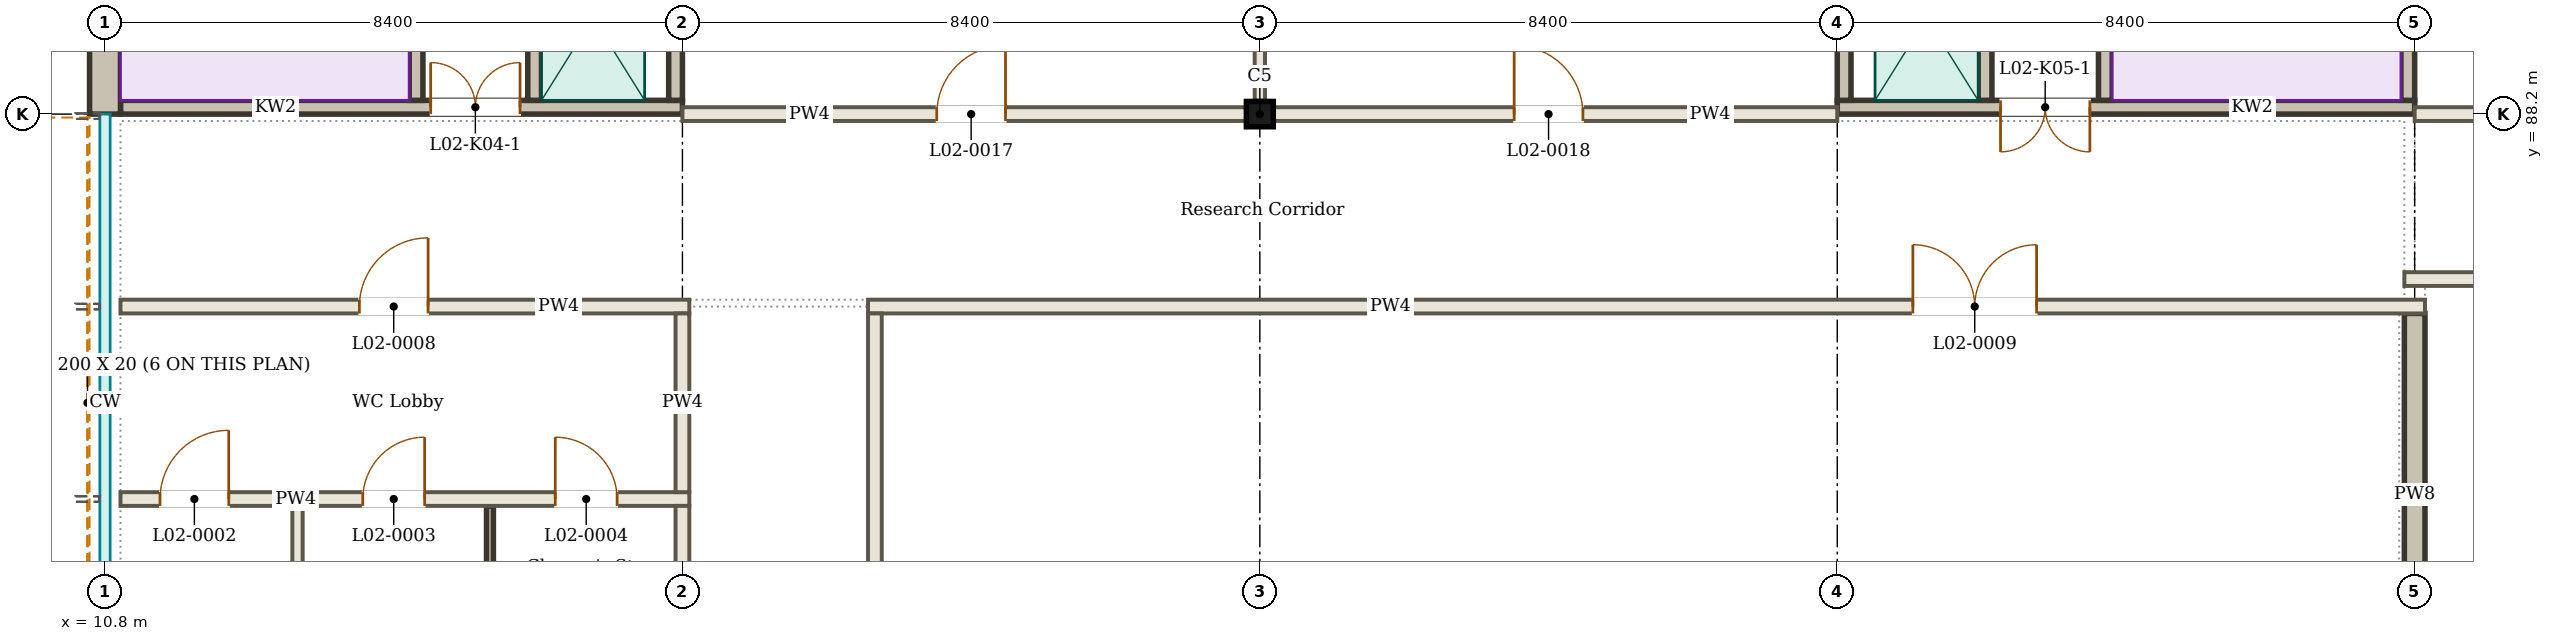
"""IFC4 building model, lengths in metres.
Left out: names, types, materials, properties, quantities, classifications, styles, units other than length and angle.
Written with IfcOpenShell. Run it as: python <this file> out.ifc"""

import sys

from ifc_helpers import new_model, si_unit, direction, frame, frame_2d, origin, origin_2d, place, context, subcontext, project, spatial, rectangle, i_section, extrude, element, fill, save


model = new_model("IFC4")
c1 = context("Model", 3, precision=1e-05, world=origin(), true_north=direction((0.0, 1.0)))
c2 = subcontext(c1, "Body", "Model", "MODEL_VIEW")
j1 = project(units=[si_unit("LENGTHUNIT", "METRE"), si_unit("PLANEANGLEUNIT", "RADIAN")], contexts=[c1])
p1 = place(None, origin())
s1 = spatial("IfcSite", under=j1, at=p1, CompositionType="ELEMENT")
p2 = place(p1, origin())
s2 = spatial("IfcBuilding", under=s1, at=p2, CompositionType="ELEMENT")
p3 = place(p2, frame((0.0, 0.0, 9.0)))
s3 = spatial("IfcBuildingStorey", under=s2, at=p3, CompositionType="ELEMENT", Elevation=9.0)
p4 = place(p3, frame((27.6, 88.2, 0.0), z_axis=(0.0, 0.0, 1.0), x_axis=(1.0, 0.0, 0.0)))
e1 = element("IfcColumn", 1, at=p4, inside=s3, PredefinedType="COLUMN", context=c2, shape_type="SweptSolid", body=[
    extrude(i_section(OverallWidth=0.391, OverallDepth=0.368, WebThickness=0.015, FlangeThickness=0.024, FilletRadius=0.027, at=origin_2d()), origin(), (0.0, 0.0, 1.0), 4.5),
])
p5 = place(p3, frame((10.64, 79.8, 3.87), z_axis=(0.0, 0.0, 1.0), x_axis=(0.0, 1.0, 0.0)))
e2 = element("IfcWall", 2, at=p5, inside=s3, PredefinedType="SOLIDWALL", context=c2, shape_type="SweptSolid", body=[
    extrude(rectangle(XDim=8.4, YDim=0.13, at=frame_2d((4.2, 0.0))), origin(), (0.0, 0.0, 1.0), 0.63),
])
p6 = place(p3, frame((11.025, 82.6, 0.0), z_axis=(0.0, 0.0, 1.0), x_axis=(1.0, 0.0, 0.0)))
e3 = element("IfcWall", 3, at=p6, inside=s3, PredefinedType="PARTITIONING", context=c2, shape_type="SweptSolid", body=[
    extrude(rectangle(XDim=8.275, YDim=0.2, at=frame_2d((4.138, 0.0))), origin(), (0.0, 0.0, 1.0), 3.8),
])
p7 = place(p6, frame((0.575, 0.0, 0.0)))
e4 = element("IfcOpeningElement", 4, at=p7, cuts=e3, PredefinedType="OPENING", context=c2, shape_type="SweptSolid", body=[
    extrude(rectangle(XDim=1.0, YDim=2.1, at=frame_2d((0.5, 1.05))), frame((0.0, 0.11, 0.0), z_axis=(0.0, -1.0, 0.0), x_axis=(1.0, 0.0, 0.0)), (0.0, 0.0, 1.0), 0.22),
])
p8 = place(p6, frame((3.525, 0.0, 0.0)))
e5 = element("IfcOpeningElement", 5, at=p8, cuts=e3, PredefinedType="OPENING", context=c2, shape_type="SweptSolid", body=[
    extrude(rectangle(XDim=0.9, YDim=2.1, at=frame_2d((0.45, 1.05))), frame((0.0, 0.11, 0.0), z_axis=(0.0, -1.0, 0.0), x_axis=(1.0, 0.0, 0.0)), (0.0, 0.0, 1.0), 0.22),
])
p9 = place(p6, frame((6.325, 0.0, 0.0)))
e6 = element("IfcOpeningElement", 6, at=p9, cuts=e3, PredefinedType="OPENING", context=c2, shape_type="SweptSolid", body=[
    extrude(rectangle(XDim=0.9, YDim=2.1, at=frame_2d((0.45, 1.05))), frame((0.0, 0.11, 0.0), z_axis=(0.0, -1.0, 0.0), x_axis=(1.0, 0.0, 0.0)), (0.0, 0.0, 1.0), 0.22),
])
p10 = place(p3, frame((11.025, 85.4, 0.0), z_axis=(0.0, 0.0, 1.0), x_axis=(1.0, 0.0, 0.0)))
e7 = element("IfcWall", 7, at=p10, inside=s3, PredefinedType="PARTITIONING", context=c2, shape_type="SweptSolid", body=[
    extrude(rectangle(XDim=8.275, YDim=0.2, at=frame_2d((4.138, 0.0))), origin(), (0.0, 0.0, 1.0), 3.8),
])
p11 = place(p10, frame((3.475, 0.0, 0.0)))
e8 = element("IfcOpeningElement", 8, at=p11, cuts=e7, PredefinedType="OPENING", context=c2, shape_type="SweptSolid", body=[
    extrude(rectangle(XDim=1.0, YDim=2.1, at=frame_2d((0.5, 1.05))), frame((0.0, 0.11, 0.0), z_axis=(0.0, -1.0, 0.0), x_axis=(1.0, 0.0, 0.0)), (0.0, 0.0, 1.0), 0.22),
])
p12 = place(p3, frame((21.9, 85.4, 0.0), z_axis=(0.0, 0.0, 1.0), x_axis=(1.0, 0.0, 0.0)))
e9 = element("IfcWall", 9, at=p12, inside=s3, PredefinedType="PARTITIONING", context=c2, shape_type="SweptSolid", body=[
    extrude(rectangle(XDim=22.65, YDim=0.2, at=frame_2d((11.325, 0.0))), origin(), (0.0, 0.0, 1.0), 3.8),
])
p13 = place(p12, frame((15.2, 0.0, 0.0)))
e10 = element("IfcOpeningElement", 10, at=p13, cuts=e9, PredefinedType="OPENING", context=c2, shape_type="SweptSolid", body=[
    extrude(rectangle(XDim=1.8, YDim=2.1, at=frame_2d((0.9, 1.05))), frame((0.0, 0.11, 0.0), z_axis=(0.0, -1.0, 0.0), x_axis=(1.0, 0.0, 0.0)), (0.0, 0.0, 1.0), 0.22),
])
p14 = place(p3, frame((44.25, 85.8, 0.0), z_axis=(0.0, 0.0, 1.0), x_axis=(1.0, 0.0, 0.0)))
e11 = element("IfcWall", 11, at=p14, inside=s3, PredefinedType="PARTITIONING", context=c2, shape_type="SweptSolid", body=[
    extrude(rectangle(XDim=67.5, YDim=0.2, at=frame_2d((33.75, 0.0))), origin(), (0.0, 0.0, 1.0), 3.9),
])
p15 = place(p14, frame((7.65, 0.0, 0.0)))
e12 = element("IfcOpeningElement", 12, at=p15, cuts=e11, PredefinedType="OPENING", context=c2, shape_type="SweptSolid", body=[
    extrude(rectangle(XDim=1.8, YDim=2.1, at=frame_2d((0.9, 1.05))), frame((0.0, 0.11, 0.0), z_axis=(0.0, -1.0, 0.0), x_axis=(1.0, 0.0, 0.0)), (0.0, 0.0, 1.0), 0.22),
])
p16 = place(p14, frame((19.25, 0.0, 0.0)))
e13 = element("IfcOpeningElement", 13, at=p16, cuts=e11, PredefinedType="OPENING", context=c2, shape_type="SweptSolid", body=[
    extrude(rectangle(XDim=1.0, YDim=2.1, at=frame_2d((0.5, 1.05))), frame((0.0, 0.11, 0.0), z_axis=(0.0, -1.0, 0.0), x_axis=(1.0, 0.0, 0.0)), (0.0, 0.0, 1.0), 0.22),
])
p17 = place(p14, frame((24.85, 0.0, 0.0)))
e14 = element("IfcOpeningElement", 14, at=p17, cuts=e11, PredefinedType="OPENING", context=c2, shape_type="SweptSolid", body=[
    extrude(rectangle(XDim=1.0, YDim=2.1, at=frame_2d((0.5, 1.05))), frame((0.0, 0.11, 0.0), z_axis=(0.0, -1.0, 0.0), x_axis=(1.0, 0.0, 0.0)), (0.0, 0.0, 1.0), 0.22),
])
p18 = place(p14, frame((31.85, 0.0, 0.0)))
e15 = element("IfcOpeningElement", 15, at=p18, cuts=e11, PredefinedType="OPENING", context=c2, shape_type="SweptSolid", body=[
    extrude(rectangle(XDim=1.0, YDim=2.1, at=frame_2d((0.5, 1.05))), frame((0.0, 0.11, 0.0), z_axis=(0.0, -1.0, 0.0), x_axis=(1.0, 0.0, 0.0)), (0.0, 0.0, 1.0), 0.22),
])
p19 = place(p14, frame((44.05, 0.0, 0.0)))
e16 = element("IfcOpeningElement", 16, at=p19, cuts=e11, PredefinedType="OPENING", context=c2, shape_type="SweptSolid", body=[
    extrude(rectangle(XDim=1.8, YDim=2.1, at=frame_2d((0.9, 1.05))), frame((0.0, 0.11, 0.0), z_axis=(0.0, -1.0, 0.0), x_axis=(1.0, 0.0, 0.0)), (0.0, 0.0, 1.0), 0.22),
])
p20 = place(p14, frame((55.65, 0.0, 0.0)))
e17 = element("IfcOpeningElement", 17, at=p20, cuts=e11, PredefinedType="OPENING", context=c2, shape_type="SweptSolid", body=[
    extrude(rectangle(XDim=1.0, YDim=2.1, at=frame_2d((0.5, 1.05))), frame((0.0, 0.11, 0.0), z_axis=(0.0, -1.0, 0.0), x_axis=(1.0, 0.0, 0.0)), (0.0, 0.0, 1.0), 0.22),
])
p21 = place(p14, frame((62.65, 0.0, 0.0)))
e18 = element("IfcOpeningElement", 18, at=p21, cuts=e11, PredefinedType="OPENING", context=c2, shape_type="SweptSolid", body=[
    extrude(rectangle(XDim=1.0, YDim=2.1, at=frame_2d((0.5, 1.05))), frame((0.0, 0.11, 0.0), z_axis=(0.0, -1.0, 0.0), x_axis=(1.0, 0.0, 0.0)), (0.0, 0.0, 1.0), 0.22),
])
p22 = place(p3, frame((19.2, 88.2, 0.0), z_axis=(0.0, 0.0, 1.0), x_axis=(1.0, 0.0, 0.0)))
e19 = element("IfcWall", 19, at=p22, inside=s3, PredefinedType="PARTITIONING", context=c2, shape_type="SweptSolid", body=[
    extrude(rectangle(XDim=8.205, YDim=0.2, at=frame_2d((4.102, 0.0))), origin(), (0.0, 0.0, 1.0), 3.8),
])
p23 = place(p22, frame((3.7, 0.0, 0.0)))
e20 = element("IfcOpeningElement", 20, at=p23, cuts=e19, PredefinedType="OPENING", context=c2, shape_type="SweptSolid", body=[
    extrude(rectangle(XDim=1.0, YDim=2.1, at=frame_2d((0.5, 1.05))), frame((0.0, 0.11, 0.0), z_axis=(0.0, -1.0, 0.0), x_axis=(1.0, 0.0, 0.0)), (0.0, 0.0, 1.0), 0.22),
])
p24 = place(p3, frame((27.795, 88.2, 0.0), z_axis=(0.0, 0.0, 1.0), x_axis=(1.0, 0.0, 0.0)))
e21 = element("IfcWall", 21, at=p24, inside=s3, PredefinedType="PARTITIONING", context=c2, shape_type="SweptSolid", body=[
    extrude(rectangle(XDim=8.205, YDim=0.2, at=frame_2d((4.102, 0.0))), origin(), (0.0, 0.0, 1.0), 3.8),
])
p25 = place(p24, frame((3.504, 0.0, 0.0)))
e22 = element("IfcOpeningElement", 22, at=p25, cuts=e21, PredefinedType="OPENING", context=c2, shape_type="SweptSolid", body=[
    extrude(rectangle(XDim=1.0, YDim=2.1, at=frame_2d((0.5, 1.05))), frame((0.0, 0.11, 0.0), z_axis=(0.0, -1.0, 0.0), x_axis=(1.0, 0.0, 0.0)), (0.0, 0.0, 1.0), 0.22),
])
p26 = place(p3, frame((44.4, 88.2, 0.0), z_axis=(0.0, 0.0, 1.0), x_axis=(1.0, 0.0, 0.0)))
e23 = element("IfcWall", 23, at=p26, inside=s3, PredefinedType="PARTITIONING", context=c2, shape_type="SweptSolid", body=[
    extrude(rectangle(XDim=8.22, YDim=0.2, at=frame_2d((4.11, 0.0))), origin(), (0.0, 0.0, 1.0), 3.9),
])
p27 = place(p26, frame((3.7, 0.0, 0.0)))
e24 = element("IfcOpeningElement", 24, at=p27, cuts=e23, PredefinedType="OPENING", context=c2, shape_type="SweptSolid", body=[
    extrude(rectangle(XDim=1.0, YDim=2.1, at=frame_2d((0.5, 1.05))), frame((0.0, 0.11, 0.0), z_axis=(0.0, -1.0, 0.0), x_axis=(1.0, 0.0, 0.0)), (0.0, 0.0, 1.0), 0.22),
])
p28 = place(p3, frame((13.6, 79.8, 0.0), z_axis=(0.0, 0.0, 1.0), x_axis=(0.0, 1.0, 0.0)))
e25 = element("IfcWall", 25, at=p28, inside=s3, PredefinedType="PARTITIONING", context=c2, shape_type="SweptSolid", body=[
    extrude(rectangle(XDim=2.7, YDim=0.15, at=frame_2d((1.35, 0.0))), origin(), (0.0, 0.0, 1.0), 3.95),
])
p29 = place(p3, frame((16.4, 79.8, 0.0), z_axis=(0.0, 0.0, 1.0), x_axis=(0.0, 1.0, 0.0)))
e26 = element("IfcWall", 26, at=p29, inside=s3, PredefinedType="SOLIDWALL", context=c2, shape_type="SweptSolid", body=[
    extrude(rectangle(XDim=2.7, YDim=0.1, at=frame_2d((1.35, 0.0))), origin(), (0.0, 0.0, 1.0), 3.95),
])
p30 = place(p3, frame((19.2, 79.8, 0.0), z_axis=(0.0, 0.0, 1.0), x_axis=(0.0, 1.0, 0.0)))
e27 = element("IfcWall", 27, at=p30, inside=s3, PredefinedType="PARTITIONING", context=c2, shape_type="SweptSolid", body=[
    extrude(rectangle(XDim=2.7, YDim=0.2, at=frame_2d((1.35, 0.0))), origin(), (0.0, 0.0, 1.0), 3.8),
])
p31 = place(p3, frame((19.2, 82.7, 0.0), z_axis=(0.0, 0.0, 1.0), x_axis=(0.0, 1.0, 0.0)))
e28 = element("IfcWall", 28, at=p31, inside=s3, PredefinedType="PARTITIONING", context=c2, shape_type="SweptSolid", body=[
    extrude(rectangle(XDim=2.6, YDim=0.2, at=frame_2d((1.3, 0.0))), origin(), (0.0, 0.0, 1.0), 3.8),
])
p32 = place(p3, frame((22.0, 71.625, 0.0), z_axis=(0.0, 0.0, 1.0), x_axis=(0.0, 1.0, 0.0)))
e29 = element("IfcWall", 29, at=p32, inside=s3, PredefinedType="PARTITIONING", context=c2, shape_type="SweptSolid", body=[
    extrude(rectangle(XDim=13.675, YDim=0.2, at=frame_2d((6.837, 0.0))), origin(), (0.0, 0.0, 1.0), 3.8),
])
p33 = place(p32, frame((2.775, 0.0, 0.0)))
e30 = element("IfcOpeningElement", 30, at=p33, cuts=e29, PredefinedType="OPENING", context=c2, shape_type="SweptSolid", body=[
    extrude(rectangle(XDim=1.0, YDim=2.1, at=frame_2d((0.5, 1.05))), frame((0.0, 0.11, 0.0), z_axis=(0.0, -1.0, 0.0), x_axis=(1.0, 0.0, 0.0)), (0.0, 0.0, 1.0), 0.22),
])
p34 = place(p3, frame((27.6, 88.396, 0.0), z_axis=(0.0, 0.0, 1.0), x_axis=(0.0, 1.0, 0.0)))
e31 = element("IfcWall", 31, at=p34, inside=s3, PredefinedType="PARTITIONING", context=c2, shape_type="SweptSolid", body=[
    extrude(rectangle(XDim=7.979, YDim=0.15, at=frame_2d((3.99, 0.0))), origin(), (0.0, 0.0, 1.0), 3.8),
])
p35 = place(p3, frame((44.4, 80.025, 0.0), z_axis=(0.0, 0.0, 1.0), x_axis=(0.0, 1.0, 0.0)))
e32 = element("IfcWall", 32, at=p35, inside=s3, PredefinedType="SOLIDWALL", context=c2, shape_type="SweptSolid", body=[
    extrude(rectangle(XDim=5.275, YDim=0.3, at=frame_2d((2.638, 0.0))), origin(), (0.0, 0.0, 1.0), 3.936),
])
p36 = place(p3, frame((11.025, 88.3, 0.0), z_axis=(0.0, 0.0, 1.0), x_axis=(1.0, 0.0, 0.0)))
e33 = element("IfcWall", 33, at=p36, inside=s3, PredefinedType="SOLIDWALL", context=c2, shape_type="SweptSolid", body=[
    extrude(rectangle(XDim=8.175, YDim=0.2, at=frame_2d((4.087, 0.0))), origin(), (0.0, 0.0, 1.0), 4.5),
])
p37 = place(p36, frame((4.512, 0.0, 0.0)))
e34 = element("IfcOpeningElement", 34, at=p37, cuts=e33, PredefinedType="OPENING", context=c2, shape_type="SweptSolid", body=[
    extrude(rectangle(XDim=1.3, YDim=2.1, at=frame_2d((0.65, 1.05))), frame((0.0, 0.11, 0.0), z_axis=(0.0, -1.0, 0.0), x_axis=(1.0, 0.0, 0.0)), (0.0, 0.0, 1.0), 0.22),
])
p38 = place(p3, frame((10.8, 88.2, 0.0), z_axis=(0.0, 0.0, 1.0), x_axis=(0.0, 1.0, 0.0)))
e35 = element("IfcWall", 35, at=p38, inside=s3, PredefinedType="SOLIDWALL", context=c2, shape_type="SweptSolid", body=[
    extrude(rectangle(XDim=8.175, YDim=0.45, at=frame_2d((4.087, 0.0))), origin(), (0.0, 0.0, 1.0), 4.5),
])
p39 = place(p3, frame((19.1, 88.4, 0.0), z_axis=(0.0, 0.0, 1.0), x_axis=(0.0, 1.0, 0.0)))
e36 = element("IfcWall", 36, at=p39, inside=s3, PredefinedType="SOLIDWALL", context=c2, shape_type="SweptSolid", body=[
    extrude(rectangle(XDim=7.975, YDim=0.2, at=frame_2d((3.988, 0.0))), origin(), (0.0, 0.0, 1.0), 4.5),
])
p40 = place(p3, frame((15.325, 88.4, 0.0), z_axis=(0.0, 0.0, 1.0), x_axis=(0.0, 1.0, 0.0)))
e37 = element("IfcWall", 37, at=p40, inside=s3, PredefinedType="SOLIDWALL", context=c2, shape_type="SweptSolid", body=[
    extrude(rectangle(XDim=7.975, YDim=0.2, at=frame_2d((3.988, 0.0))), origin(), (0.0, 0.0, 1.0), 4.5),
])
p41 = place(p40, frame((6.538, 0.0, 0.0)))
e38 = element("IfcOpeningElement", 38, at=p41, cuts=e37, PredefinedType="OPENING", context=c2, shape_type="SweptSolid", body=[
    extrude(rectangle(XDim=1.1, YDim=2.1, at=frame_2d((0.55, 1.05))), frame((0.0, 0.11, 0.0), z_axis=(0.0, -1.0, 0.0), x_axis=(1.0, 0.0, 0.0)), (0.0, 0.0, 1.0), 0.22),
])
p42 = place(p3, frame((17.05, 88.4, 0.0), z_axis=(0.0, 0.0, 1.0), x_axis=(0.0, 1.0, 0.0)))
e39 = element("IfcWall", 39, at=p42, inside=s3, PredefinedType="SOLIDWALL", context=c2, shape_type="SweptSolid", body=[
    extrude(rectangle(XDim=2.95, YDim=0.2, at=frame_2d((1.475, 0.0))), origin(), (0.0, 0.0, 1.0), 4.5),
])
p43 = place(p3, frame((44.4, 88.3, 0.0), z_axis=(0.0, 0.0, 1.0), x_axis=(-1.0, 0.0, 0.0)))
e40 = element("IfcWall", 40, at=p43, inside=s3, PredefinedType="SOLIDWALL", context=c2, shape_type="SweptSolid", body=[
    extrude(rectangle(XDim=8.4, YDim=0.2, at=frame_2d((4.2, 0.0))), origin(), (0.0, 0.0, 1.0), 4.5),
])
p44 = place(p43, frame((4.725, 0.0, 0.0)))
e41 = element("IfcOpeningElement", 41, at=p44, cuts=e40, PredefinedType="OPENING", context=c2, shape_type="SweptSolid", body=[
    extrude(rectangle(XDim=1.3, YDim=2.1, at=frame_2d((0.65, 1.05))), frame((0.0, 0.11, 0.0), z_axis=(0.0, -1.0, 0.0), x_axis=(1.0, 0.0, 0.0)), (0.0, 0.0, 1.0), 0.22),
])
for number, where, z_axis, x_axis in (
    (42, (44.3, 88.4, 0.0), (0.0, 0.0, 1.0), (0.0, 1.0, 0.0)),
    (43, (36.1, 88.4, 0.0), (0.0, 0.0, 1.0), (0.0, 1.0, 0.0)),
):
    element("IfcWall", number, at=place(p3, frame(where, z_axis=z_axis, x_axis=x_axis)), inside=s3, PredefinedType="SOLIDWALL", context=c2, shape_type="SweptSolid", body=[
        extrude(rectangle(XDim=7.975, YDim=0.2, at=frame_2d((3.988, 0.0))), origin(), (0.0, 0.0, 1.0), 4.5),
    ])
p45 = place(p3, frame((39.9, 88.4, 0.0), z_axis=(0.0, 0.0, 1.0), x_axis=(0.0, 1.0, 0.0)))
e44 = element("IfcWall", 44, at=p45, inside=s3, PredefinedType="SOLIDWALL", context=c2, shape_type="SweptSolid", body=[
    extrude(rectangle(XDim=7.975, YDim=0.2, at=frame_2d((3.988, 0.0))), origin(), (0.0, 0.0, 1.0), 4.5),
])
p46 = place(p45, frame((6.538, 0.0, 0.0)))
e45 = element("IfcOpeningElement", 45, at=p46, cuts=e44, PredefinedType="OPENING", context=c2, shape_type="SweptSolid", body=[
    extrude(rectangle(XDim=1.1, YDim=2.1, at=frame_2d((0.55, 1.05))), frame((0.0, 0.11, 0.0), z_axis=(0.0, -1.0, 0.0), x_axis=(1.0, 0.0, 0.0)), (0.0, 0.0, 1.0), 0.22),
])
p47 = place(p3, frame((38.15, 88.4, 0.0), z_axis=(0.0, 0.0, 1.0), x_axis=(0.0, 1.0, 0.0)))
e46 = element("IfcWall", 46, at=p47, inside=s3, PredefinedType="SOLIDWALL", context=c2, shape_type="SweptSolid", body=[
    extrude(rectangle(XDim=2.95, YDim=0.2, at=frame_2d((1.475, 0.0))), origin(), (0.0, 0.0, 1.0), 4.5),
])
p48 = place(p7, origin())
e47 = element("IfcDoor", 47, at=p48, inside=s3, OperationType="SINGLE_SWING_RIGHT", PredefinedType="DOOR", context=c2, shape_type="SweptSolid", body=[
    extrude(rectangle(XDim=1.0, YDim=2.1, at=frame_2d((0.5, 1.05))), frame((0.0, 0.025, 0.0), z_axis=(0.0, -1.0, 0.0), x_axis=(1.0, 0.0, 0.0)), (0.0, 0.0, 1.0), 0.05),
])
fill(e4, e47)
p49 = place(p8, origin())
e48 = element("IfcDoor", 48, at=p49, inside=s3, OperationType="SINGLE_SWING_RIGHT", PredefinedType="DOOR", context=c2, shape_type="SweptSolid", body=[
    extrude(rectangle(XDim=0.9, YDim=2.1, at=frame_2d((0.45, 1.05))), frame((0.0, 0.025, 0.0), z_axis=(0.0, -1.0, 0.0), x_axis=(1.0, 0.0, 0.0)), (0.0, 0.0, 1.0), 0.05),
])
fill(e5, e48)
p50 = place(p9, origin())
e49 = element("IfcDoor", 49, at=p50, inside=s3, OperationType="SINGLE_SWING_LEFT", PredefinedType="DOOR", context=c2, shape_type="SweptSolid", body=[
    extrude(rectangle(XDim=0.9, YDim=2.1, at=frame_2d((0.45, 1.05))), frame((0.0, 0.025, 0.0), z_axis=(0.0, -1.0, 0.0), x_axis=(1.0, 0.0, 0.0)), (0.0, 0.0, 1.0), 0.05),
])
fill(e6, e49)
p51 = place(p11, origin())
e50 = element("IfcDoor", 50, at=p51, inside=s3, OperationType="SINGLE_SWING_RIGHT", PredefinedType="DOOR", context=c2, shape_type="SweptSolid", body=[
    extrude(rectangle(XDim=1.0, YDim=2.1, at=frame_2d((0.5, 1.05))), frame((0.0, 0.025, 0.0), z_axis=(0.0, -1.0, 0.0), x_axis=(1.0, 0.0, 0.0)), (0.0, 0.0, 1.0), 0.05),
])
fill(e8, e50)
p52 = place(p13, origin())
e51 = element("IfcDoor", 51, at=p52, inside=s3, OperationType="DOUBLE_DOOR_SINGLE_SWING", PredefinedType="DOOR", context=c2, shape_type="SweptSolid", body=[
    extrude(rectangle(XDim=1.8, YDim=2.1, at=frame_2d((0.9, 1.05))), frame((0.0, 0.025, 0.0), z_axis=(0.0, -1.0, 0.0), x_axis=(1.0, 0.0, 0.0)), (0.0, 0.0, 1.0), 0.05),
])
fill(e10, e51)
p53 = place(p23, origin())
e52 = element("IfcDoor", 52, at=p53, inside=s3, OperationType="SINGLE_SWING_RIGHT", PredefinedType="DOOR", context=c2, shape_type="SweptSolid", body=[
    extrude(rectangle(XDim=1.0, YDim=2.1, at=frame_2d((0.5, 1.05))), frame((0.0, 0.025, 0.0), z_axis=(0.0, -1.0, 0.0), x_axis=(1.0, 0.0, 0.0)), (0.0, 0.0, 1.0), 0.05),
])
fill(e20, e52)
p54 = place(p25, origin())
e53 = element("IfcDoor", 53, at=p54, inside=s3, OperationType="SINGLE_SWING_LEFT", PredefinedType="DOOR", context=c2, shape_type="SweptSolid", body=[
    extrude(rectangle(XDim=1.0, YDim=2.1, at=frame_2d((0.5, 1.05))), frame((0.0, 0.025, 0.0), z_axis=(0.0, -1.0, 0.0), x_axis=(1.0, 0.0, 0.0)), (0.0, 0.0, 1.0), 0.05),
])
fill(e22, e53)
p55 = place(p37, origin())
e54 = element("IfcDoor", 54, at=p55, inside=s3, OperationType="DOUBLE_DOOR_DOUBLE_SWING", PredefinedType="DOOR", context=c2, shape_type="SweptSolid", body=[
    extrude(rectangle(XDim=1.3, YDim=2.1, at=frame_2d((0.65, 1.05))), frame((0.0, 0.025, 0.0), z_axis=(0.0, -1.0, 0.0), x_axis=(1.0, 0.0, 0.0)), (0.0, 0.0, 1.0), 0.05),
])
fill(e34, e54)
p56 = place(p44, origin())
e55 = element("IfcDoor", 55, at=p56, inside=s3, OperationType="DOUBLE_DOOR_DOUBLE_SWING", PredefinedType="DOOR", context=c2, shape_type="SweptSolid", body=[
    extrude(rectangle(XDim=1.3, YDim=2.1, at=frame_2d((0.65, 1.05))), frame((0.0, 0.025, 0.0), z_axis=(0.0, -1.0, 0.0), x_axis=(1.0, 0.0, 0.0)), (0.0, 0.0, 1.0), 0.05),
])
fill(e41, e55)
save(model, sys.argv[1])
